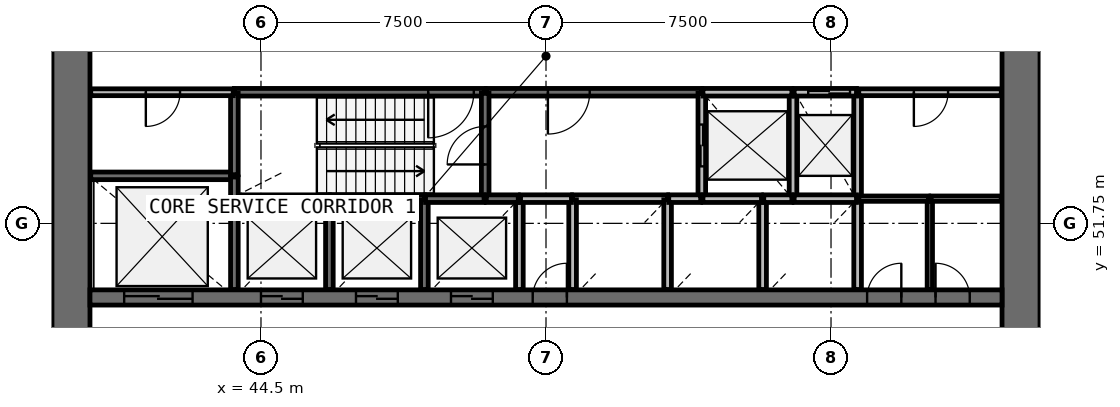
"""IFC4 building model, lengths in metres.
Left out: names, types, materials, properties, quantities, classifications, styles, units other than length and angle.
Written with IfcOpenShell. Run it as: python <this file> out.ifc"""

import sys

from ifc_helpers import new_model, si_unit, direction, frame, frame_2d, origin, place, context, subcontext, project, spatial, rectangle, extrude, source, transform, mapped, element, fill, save


model = new_model("IFC4")
c1 = context("Model", 3, precision=1e-05, world=origin(), true_north=direction((0.0, 1.0)))
c2 = subcontext(c1, "Body", "Model", "MODEL_VIEW")
j1 = project(units=[si_unit("LENGTHUNIT", "METRE"), si_unit("PLANEANGLEUNIT", "RADIAN")], contexts=[c1])
p1 = place(None, origin())
s1 = spatial("IfcSite", under=j1, at=p1, CompositionType="ELEMENT")
p2 = place(p1, origin())
s2 = spatial("IfcBuilding", under=s1, at=p2, CompositionType="ELEMENT")
p3 = place(p2, frame((0.0, 0.0, 40.2)))
s3 = spatial("IfcBuildingStorey", under=s2, at=p3, CompositionType="ELEMENT", Elevation=40.2)
p4 = place(p3, frame((64.5, 38.0, 0.0), z_axis=(0.0, 0.0, 1.0), x_axis=(0.0, 1.0, 0.0)))
e1 = element("IfcWall", 1, at=p4, inside=s3, PredefinedType="SHEAR", context=c2, shape_type="SweptSolid", body=[
    extrude(rectangle(XDim=20.0, YDim=1.0, at=frame_2d((10.0, 0.0))), origin(), (0.0, 0.0, 1.0), 4.4),
])
p5 = place(p4, frame((9.1, 0.0, 0.0)))
e2 = element("IfcOpeningElement", 2, at=p5, cuts=e1, PredefinedType="OPENING", context=c2, shape_type="SweptSolid", body=[
    extrude(rectangle(XDim=1.8, YDim=2.1, at=frame_2d((0.9, 1.05))), frame((0.0, 0.51, 0.0), z_axis=(0.0, -1.0, 0.0), x_axis=(1.0, 0.0, 0.0)), (0.0, 0.0, 1.0), 1.02),
])
p6 = place(p3, frame((39.5, 58.0, 0.0), z_axis=(0.0, 0.0, 1.0), x_axis=(0.0, -1.0, 0.0)))
e3 = element("IfcWall", 3, at=p6, inside=s3, PredefinedType="SHEAR", context=c2, shape_type="SweptSolid", body=[
    extrude(rectangle(XDim=20.0, YDim=1.0, at=frame_2d((10.0, 0.0))), origin(), (0.0, 0.0, 1.0), 4.4),
])
p7 = place(p6, frame((9.1, 0.0, 0.0)))
e4 = element("IfcOpeningElement", 4, at=p7, cuts=e3, PredefinedType="OPENING", context=c2, shape_type="SweptSolid", body=[
    extrude(rectangle(XDim=1.8, YDim=2.1, at=frame_2d((0.9, 1.05))), frame((0.0, 0.51, 0.0), z_axis=(0.0, -1.0, 0.0), x_axis=(1.0, 0.0, 0.0)), (0.0, 0.0, 1.0), 1.02),
])
p8 = place(p3, frame((40.0, 49.8, 0.0), z_axis=(0.0, 0.0, 1.0), x_axis=(1.0, 0.0, 0.0)))
e5 = element("IfcWall", 5, at=p8, inside=s3, PredefinedType="SHEAR", context=c2, shape_type="SweptSolid", body=[
    extrude(rectangle(XDim=24.0, YDim=0.4, at=frame_2d((12.0, 0.0))), origin(), (0.0, 0.0, 1.0), 4.4),
])
p9 = place(p8, frame((4.5, 0.0, 0.0)))
e6 = element("IfcOpeningElement", 6, at=p9, cuts=e5, PredefinedType="OPENING", context=c2, shape_type="SweptSolid", body=[
    extrude(rectangle(XDim=1.1, YDim=2.1, at=frame_2d((0.55, 1.05))), frame((0.0, 0.21, 0.0), z_axis=(0.0, -1.0, 0.0), x_axis=(1.0, 0.0, 0.0)), (0.0, 0.0, 1.0), 0.42),
])
p10 = place(p8, frame((7.0, 0.0, 0.0)))
e7 = element("IfcOpeningElement", 7, at=p10, cuts=e5, PredefinedType="OPENING", context=c2, shape_type="SweptSolid", body=[
    extrude(rectangle(XDim=1.1, YDim=2.1, at=frame_2d((0.55, 1.05))), frame((0.0, 0.21, 0.0), z_axis=(0.0, -1.0, 0.0), x_axis=(1.0, 0.0, 0.0)), (0.0, 0.0, 1.0), 0.42),
])
p11 = place(p8, frame((9.5, 0.0, 0.0)))
e8 = element("IfcOpeningElement", 8, at=p11, cuts=e5, PredefinedType="OPENING", context=c2, shape_type="SweptSolid", body=[
    extrude(rectangle(XDim=1.1, YDim=2.1, at=frame_2d((0.55, 1.05))), frame((0.0, 0.21, 0.0), z_axis=(0.0, -1.0, 0.0), x_axis=(1.0, 0.0, 0.0)), (0.0, 0.0, 1.0), 0.42),
])
p12 = place(p8, frame((0.9, 0.0, 0.0)))
e9 = element("IfcOpeningElement", 9, at=p12, cuts=e5, PredefinedType="OPENING", context=c2, shape_type="SweptSolid", body=[
    extrude(rectangle(XDim=1.8, YDim=2.4, at=frame_2d((0.9, 1.2))), frame((0.0, 0.21, 0.0), z_axis=(0.0, -1.0, 0.0), x_axis=(1.0, 0.0, 0.0)), (0.0, 0.0, 1.0), 0.42),
])
p13 = place(p8, frame((20.45, 0.0, 0.0)))
e10 = element("IfcOpeningElement", 10, at=p13, cuts=e5, PredefinedType="OPENING", context=c2, shape_type="SweptSolid", body=[
    extrude(rectangle(XDim=0.9, YDim=2.1, at=frame_2d((0.45, 1.05))), frame((0.0, 0.21, 0.0), z_axis=(0.0, -1.0, 0.0), x_axis=(1.0, 0.0, 0.0)), (0.0, 0.0, 1.0), 0.42),
])
p14 = place(p8, frame((22.25, 0.0, 0.0)))
e11 = element("IfcOpeningElement", 11, at=p14, cuts=e5, PredefinedType="OPENING", context=c2, shape_type="SweptSolid", body=[
    extrude(rectangle(XDim=0.9, YDim=2.1, at=frame_2d((0.45, 1.05))), frame((0.0, 0.21, 0.0), z_axis=(0.0, -1.0, 0.0), x_axis=(1.0, 0.0, 0.0)), (0.0, 0.0, 1.0), 0.42),
])
p15 = place(p8, frame((11.65, 0.0, 0.0)))
e12 = element("IfcOpeningElement", 12, at=p15, cuts=e5, PredefinedType="OPENING", context=c2, shape_type="SweptSolid", body=[
    extrude(rectangle(XDim=0.9, YDim=2.1, at=frame_2d((0.45, 1.05))), frame((0.0, 0.21, 0.0), z_axis=(0.0, -1.0, 0.0), x_axis=(1.0, 0.0, 0.0)), (0.0, 0.0, 1.0), 0.42),
])
p16 = place(p3, frame((50.4, 55.2, 0.0), z_axis=(0.0, 0.0, 1.0), x_axis=(-1.0, 0.0, 0.0)))
e13 = element("IfcWall", 13, at=p16, inside=s3, PredefinedType="SOLIDWALL", context=c2, shape_type="SweptSolid", body=[
    extrude(rectangle(XDim=6.6, YDim=0.2, at=frame_2d((3.3, 0.0))), origin(), (0.0, 0.0, 1.0), 3.95),
])
p17 = place(p16, frame((0.3, 0.0, 0.0)))
e14 = element("IfcOpeningElement", 14, at=p17, cuts=e13, PredefinedType="OPENING", context=c2, shape_type="SweptSolid", body=[
    extrude(rectangle(XDim=1.2, YDim=2.1, at=frame_2d((0.6, 1.05))), frame((0.0, 0.11, 0.0), z_axis=(0.0, -1.0, 0.0), x_axis=(1.0, 0.0, 0.0)), (0.0, 0.0, 1.0), 0.22),
])
p18 = place(p3, frame((56.1, 55.2, 0.0), z_axis=(0.0, 0.0, 1.0), x_axis=(-1.0, 0.0, 0.0)))
e15 = element("IfcWall", 15, at=p18, inside=s3, PredefinedType="SOLIDWALL", context=c2, shape_type="SweptSolid", body=[
    extrude(rectangle(XDim=5.67, YDim=0.2, at=frame_2d((2.835, 0.0))), origin(), (0.0, 0.0, 1.0), 3.95),
])
p19 = place(p18, frame((2.95, 0.0, 0.0)))
e16 = element("IfcOpeningElement", 16, at=p19, cuts=e15, PredefinedType="OPENING", context=c2, shape_type="SweptSolid", body=[
    extrude(rectangle(XDim=1.1, YDim=2.1, at=frame_2d((0.55, 1.05))), frame((0.0, 0.11, 0.0), z_axis=(0.0, -1.0, 0.0), x_axis=(1.0, 0.0, 0.0)), (0.0, 0.0, 1.0), 0.22),
])
p20 = place(p3, frame((43.8, 53.0, 0.0), z_axis=(0.0, 0.0, 1.0), x_axis=(-1.0, 0.0, 0.0)))
e17 = element("IfcWall", 17, at=p20, inside=s3, PredefinedType="SOLIDWALL", context=c2, shape_type="SweptSolid", body=[
    extrude(rectangle(XDim=3.78, YDim=0.2, at=frame_2d((1.89, 0.0))), origin(), (0.0, 0.0, 1.0), 3.95),
])
p21 = place(p3, frame((50.4, 52.4, 0.0), z_axis=(0.0, 0.0, 1.0), x_axis=(0.0, 1.0, 0.0)))
e18 = element("IfcWall", 18, at=p21, inside=s3, PredefinedType="SOLIDWALL", context=c2, shape_type="SweptSolid", body=[
    extrude(rectangle(XDim=2.77, YDim=0.2, at=frame_2d((1.385, 0.0))), origin(), (0.0, 0.0, 1.0), 3.95),
])
p22 = place(p21, frame((0.9, 0.0, 0.0)))
e19 = element("IfcOpeningElement", 19, at=p22, cuts=e18, PredefinedType="OPENING", context=c2, shape_type="SweptSolid", body=[
    extrude(rectangle(XDim=1.0, YDim=2.1, at=frame_2d((0.5, 1.05))), frame((0.0, 0.11, 0.0), z_axis=(0.0, -1.0, 0.0), x_axis=(1.0, 0.0, 0.0)), (0.0, 0.0, 1.0), 0.22),
])
p23 = place(p3, frame((56.1, 55.17, 0.0), z_axis=(0.0, 0.0, 1.0), x_axis=(0.0, -1.0, 0.0)))
e20 = element("IfcWall", 20, at=p23, inside=s3, PredefinedType="SOLIDWALL", context=c2, shape_type="SweptSolid", body=[
    extrude(rectangle(XDim=2.77, YDim=0.2, at=frame_2d((1.385, 0.0))), origin(), (0.0, 0.0, 1.0), 3.95),
])
p24 = place(p23, frame((0.82, 0.0, 0.0)))
e21 = element("IfcOpeningElement", 21, at=p24, cuts=e20, PredefinedType="OPENING", context=c2, shape_type="SweptSolid", body=[
    extrude(rectangle(XDim=1.1, YDim=2.1, at=frame_2d((0.55, 1.05))), frame((0.0, 0.11, 0.0), z_axis=(0.0, -1.0, 0.0), x_axis=(1.0, 0.0, 0.0)), (0.0, 0.0, 1.0), 0.22),
])
for number, where, z_axis, x_axis in (
    (22, (58.5, 52.4, 0.0), (0.0, 0.0, 1.0), (0.0, 1.0, 0.0)),
    (23, (60.2, 52.4, 0.0), (0.0, 0.0, 1.0), (0.0, 1.0, 0.0)),
):
    element("IfcWall", number, at=place(p3, frame(where, z_axis=z_axis, x_axis=x_axis)), inside=s3, PredefinedType="SOLIDWALL", context=c2, shape_type="SweptSolid", body=[
        extrude(rectangle(XDim=2.8, YDim=0.2, at=frame_2d((1.4, 0.0))), origin(), (0.0, 0.0, 1.0), 3.95),
    ])
p25 = place(p3, frame((46.3, 52.4, 0.0), z_axis=(0.0, 0.0, 1.0), x_axis=(-1.0, 0.0, 0.0)))
e24 = element("IfcWall", 24, at=p25, inside=s3, PredefinedType="SOLIDWALL", context=c2, shape_type="SweptSolid", body=[
    extrude(rectangle(XDim=2.5, YDim=0.2, at=frame_2d((1.25, 0.0))), origin(), (0.0, 0.0, 1.0), 3.95),
])
p26 = place(p3, frame((48.8, 52.4, 0.0), z_axis=(0.0, 0.0, 1.0), x_axis=(-1.0, 0.0, 0.0)))
e25 = element("IfcWall", 25, at=p26, inside=s3, PredefinedType="SOLIDWALL", context=c2, shape_type="SweptSolid", body=[
    extrude(rectangle(XDim=2.47, YDim=0.2, at=frame_2d((1.235, 0.0))), origin(), (0.0, 0.0, 1.0), 3.95),
])
p27 = place(p3, frame((55.2, 52.4, 0.0), z_axis=(0.0, 0.0, 1.0), x_axis=(-1.0, 0.0, 0.0)))
e26 = element("IfcWall", 26, at=p27, inside=s3, PredefinedType="SOLIDWALL", context=c2, shape_type="SweptSolid", body=[
    extrude(rectangle(XDim=2.5, YDim=0.2, at=frame_2d((1.25, 0.0))), origin(), (0.0, 0.0, 1.0), 3.95),
])
p28 = place(p3, frame((58.47, 55.2, 0.0), z_axis=(0.0, 0.0, 1.0), x_axis=(-1.0, 0.0, 0.0)))
e27 = element("IfcWall", 27, at=p28, inside=s3, PredefinedType="SOLIDWALL", context=c2, shape_type="SweptSolid", body=[
    extrude(rectangle(XDim=2.34, YDim=0.2, at=frame_2d((1.17, 0.0))), origin(), (0.0, 0.0, 1.0), 3.95),
])
for number, where, z_axis, x_axis in (
    (28, (43.8, 52.37, 0.0), (0.0, 0.0, 1.0), (0.0, -1.0, 0.0)),
    (29, (46.3, 50.01, 0.0), (0.0, 0.0, 1.0), (0.0, 1.0, 0.0)),
    (30, (48.8, 50.01, 0.0), (0.0, 0.0, 1.0), (0.0, 1.0, 0.0)),
):
    element("IfcWall", number, at=place(p3, frame(where, z_axis=z_axis, x_axis=x_axis)), inside=s3, PredefinedType="SOLIDWALL", context=c2, shape_type="SweptSolid", body=[
        extrude(rectangle(XDim=2.36, YDim=0.2, at=frame_2d((1.18, 0.0))), origin(), (0.0, 0.0, 1.0), 3.95),
    ])
p29 = place(p3, frame((51.3, 50.01, 0.0), z_axis=(0.0, 0.0, 1.0), x_axis=(0.0, 1.0, 0.0)))
e31 = element("IfcWall", 31, at=p29, inside=s3, PredefinedType="SOLIDWALL", context=c2, shape_type="SweptSolid", body=[
    extrude(rectangle(XDim=2.39, YDim=0.2, at=frame_2d((1.195, 0.0))), origin(), (0.0, 0.0, 1.0), 3.95),
])
for number, where, z_axis, x_axis in (
    (32, (52.7, 52.37, 0.0), (0.0, 0.0, 1.0), (0.0, -1.0, 0.0)),
    (33, (55.2, 50.01, 0.0), (0.0, 0.0, 1.0), (0.0, 1.0, 0.0)),
):
    element("IfcWall", number, at=place(p3, frame(where, z_axis=z_axis, x_axis=x_axis)), inside=s3, PredefinedType="SOLIDWALL", context=c2, shape_type="SweptSolid", body=[
        extrude(rectangle(XDim=2.36, YDim=0.2, at=frame_2d((1.18, 0.0))), origin(), (0.0, 0.0, 1.0), 3.95),
    ])
p30 = place(p3, frame((57.7, 50.01, 0.0), z_axis=(0.0, 0.0, 1.0), x_axis=(0.0, 1.0, 0.0)))
e34 = element("IfcWall", 34, at=p30, inside=s3, PredefinedType="SOLIDWALL", context=c2, shape_type="SweptSolid", body=[
    extrude(rectangle(XDim=2.39, YDim=0.2, at=frame_2d((1.195, 0.0))), origin(), (0.0, 0.0, 1.0), 3.95),
])
p31 = place(p3, frame((60.2, 50.01, 0.0), z_axis=(0.0, 0.0, 1.0), x_axis=(0.0, 1.0, 0.0)))
e35 = element("IfcWall", 35, at=p31, inside=s3, PredefinedType="SOLIDWALL", context=c2, shape_type="SweptSolid", body=[
    extrude(rectangle(XDim=2.36, YDim=0.2, at=frame_2d((1.18, 0.0))), origin(), (0.0, 0.0, 1.0), 3.95),
])
p32 = place(p3, frame((43.8, 55.17, 0.0), z_axis=(0.0, 0.0, 1.0), x_axis=(0.0, -1.0, 0.0)))
e36 = element("IfcWall", 36, at=p32, inside=s3, PredefinedType="SOLIDWALL", context=c2, shape_type="SweptSolid", body=[
    extrude(rectangle(XDim=2.14, YDim=0.2, at=frame_2d((1.07, 0.0))), origin(), (0.0, 0.0, 1.0), 3.95),
])
p33 = place(p3, frame((60.17, 52.4, 0.0), z_axis=(0.0, 0.0, 1.0), x_axis=(-1.0, 0.0, 0.0)))
e37 = element("IfcWall", 37, at=p33, inside=s3, PredefinedType="SOLIDWALL", context=c2, shape_type="SweptSolid", body=[
    extrude(rectangle(XDim=1.64, YDim=0.2, at=frame_2d((0.82, 0.0))), origin(), (0.0, 0.0, 1.0), 3.95),
])
p34 = place(p3, frame((60.17, 55.2, 0.0), z_axis=(0.0, 0.0, 1.0), x_axis=(-1.0, 0.0, 0.0)))
e38 = element("IfcWall", 38, at=p34, inside=s3, PredefinedType="SOLIDWALL", context=c2, shape_type="SweptSolid", body=[
    extrude(rectangle(XDim=1.64, YDim=0.2, at=frame_2d((0.82, 0.0))), origin(), (0.0, 0.0, 1.0), 3.95),
])
p35 = place(p34, frame((0.17, 0.0, 0.0)))
e39 = element("IfcOpeningElement", 39, at=p35, cuts=e38, PredefinedType="OPENING", context=c2, shape_type="SweptSolid", body=[
    extrude(rectangle(XDim=1.1, YDim=2.1, at=frame_2d((0.55, 1.05))), frame((0.0, 0.11, 0.0), z_axis=(0.0, -1.0, 0.0), x_axis=(1.0, 0.0, 0.0)), (0.0, 0.0, 1.0), 0.22),
])
for number, where, z_axis, x_axis in (
    (40, (50.37, 52.4, 0.0), (0.0, 0.0, 1.0), (-1.0, 0.0, 0.0)),
    (41, (57.67, 52.4, 0.0), (0.0, 0.0, 1.0), (-1.0, 0.0, 0.0)),
):
    element("IfcWall", number, at=place(p3, frame(where, z_axis=z_axis, x_axis=x_axis)), inside=s3, PredefinedType="SOLIDWALL", context=c2, shape_type="SweptSolid", body=[
        extrude(rectangle(XDim=1.54, YDim=0.2, at=frame_2d((0.77, 0.0))), origin(), (0.0, 0.0, 1.0), 3.95),
    ])
p36 = place(p3, frame((51.33, 52.4, 0.0), z_axis=(0.0, 0.0, 1.0), x_axis=(1.0, 0.0, 0.0)))
e42 = element("IfcWall", 42, at=p36, inside=s3, PredefinedType="SOLIDWALL", context=c2, shape_type="SweptSolid", body=[
    extrude(rectangle(XDim=1.34, YDim=0.2, at=frame_2d((0.67, 0.0))), origin(), (0.0, 0.0, 1.0), 3.95),
])
for number, where, z_axis, x_axis in (
    (43, (51.27, 52.4, 0.0), (0.0, 0.0, 1.0), (-1.0, 0.0, 0.0)),
    (44, (56.07, 52.4, 0.0), (0.0, 0.0, 1.0), (-1.0, 0.0, 0.0)),
):
    element("IfcWall", number, at=place(p3, frame(where, z_axis=z_axis, x_axis=x_axis)), inside=s3, PredefinedType="SOLIDWALL", context=c2, shape_type="SweptSolid", body=[
        extrude(rectangle(XDim=0.84, YDim=0.2, at=frame_2d((0.42, 0.0))), origin(), (0.0, 0.0, 1.0), 3.95),
    ])
p37 = place(p3, frame((58.47, 52.4, 0.0), z_axis=(0.0, 0.0, 1.0), x_axis=(-1.0, 0.0, 0.0)))
e45 = element("IfcWall", 45, at=p37, inside=s3, PredefinedType="SOLIDWALL", context=c2, shape_type="SweptSolid", body=[
    extrude(rectangle(XDim=0.74, YDim=0.2, at=frame_2d((0.37, 0.0))), origin(), (0.0, 0.0, 1.0), 3.95),
])
p38 = place(p3, frame((43.8, 52.43, 0.0), z_axis=(0.0, 0.0, 1.0), x_axis=(0.0, 1.0, 0.0)))
e46 = element("IfcWall", 46, at=p38, inside=s3, PredefinedType="SOLIDWALL", context=c2, shape_type="SweptSolid", body=[
    extrude(rectangle(XDim=0.54, YDim=0.2, at=frame_2d((0.27, 0.0))), origin(), (0.0, 0.0, 1.0), 3.95),
])
p39 = place(p3, frame((43.77, 55.2, 0.0), z_axis=(0.0, 0.0, 1.0), x_axis=(-1.0, 0.0, 0.0)))
e47 = element("IfcWall", 47, at=p39, inside=s3, PredefinedType="PARTITIONING", context=c2, shape_type="SweptSolid", body=[
    extrude(rectangle(XDim=3.75, YDim=0.18, at=frame_2d((1.875, 0.0))), origin(), (0.0, 0.0, 1.0), 3.95),
])
p40 = place(p39, frame((1.4, 0.0, 0.0)))
e48 = element("IfcOpeningElement", 48, at=p40, cuts=e47, PredefinedType="OPENING", context=c2, shape_type="SweptSolid", body=[
    extrude(rectangle(XDim=0.9, YDim=2.1, at=frame_2d((0.45, 1.05))), frame((0.0, 0.1, 0.0), z_axis=(0.0, -1.0, 0.0), x_axis=(1.0, 0.0, 0.0)), (0.0, 0.0, 1.0), 0.2),
])
p41 = place(p3, frame((63.98, 55.2, 0.0), z_axis=(0.0, 0.0, 1.0), x_axis=(-1.0, 0.0, 0.0)))
e49 = element("IfcWall", 49, at=p41, inside=s3, PredefinedType="PARTITIONING", context=c2, shape_type="SweptSolid", body=[
    extrude(rectangle(XDim=3.75, YDim=0.18, at=frame_2d((1.875, 0.0))), origin(), (0.0, 0.0, 1.0), 3.95),
])
p42 = place(p41, frame((1.4, 0.0, 0.0)))
e50 = element("IfcOpeningElement", 50, at=p42, cuts=e49, PredefinedType="OPENING", context=c2, shape_type="SweptSolid", body=[
    extrude(rectangle(XDim=0.9, YDim=2.1, at=frame_2d((0.45, 1.05))), frame((0.0, 0.1, 0.0), z_axis=(0.0, -1.0, 0.0), x_axis=(1.0, 0.0, 0.0)), (0.0, 0.0, 1.0), 0.2),
])
p43 = place(p3, frame((62.1, 50.01, 0.0), z_axis=(0.0, 0.0, 1.0), x_axis=(0.0, 1.0, 0.0)))
e51 = element("IfcWall", 51, at=p43, inside=s3, PredefinedType="PARTITIONING", context=c2, shape_type="SweptSolid", body=[
    extrude(rectangle(XDim=2.39, YDim=0.14, at=frame_2d((1.195, 0.0))), origin(), (0.0, 0.0, 1.0), 3.05),
])
p44 = place(p3, frame((62.07, 52.4, 0.0), z_axis=(0.0, 0.0, 1.0), x_axis=(-1.0, 0.0, 0.0)))
e52 = element("IfcWall", 52, at=p44, inside=s3, PredefinedType="PARTITIONING", context=c2, shape_type="SweptSolid", body=[
    extrude(rectangle(XDim=1.84, YDim=0.14, at=frame_2d((0.92, 0.0))), origin(), (0.0, 0.0, 1.0), 3.05),
])
p45 = place(p3, frame((63.98, 52.4, 0.0), z_axis=(0.0, 0.0, 1.0), x_axis=(-1.0, 0.0, 0.0)))
e53 = element("IfcWall", 53, at=p45, inside=s3, PredefinedType="PARTITIONING", context=c2, shape_type="SweptSolid", body=[
    extrude(rectangle(XDim=1.85, YDim=0.14, at=frame_2d((0.925, 0.0))), origin(), (0.0, 0.0, 1.0), 3.05),
])
m1 = source(origin(), c2, "Body", "SweptSolid", [
    extrude(rectangle(XDim=1.1, YDim=2.1, at=frame_2d((0.55, 1.05))), frame((0.0, 0.025, 0.0), z_axis=(0.0, -1.0, 0.0), x_axis=(1.0, 0.0, 0.0)), (0.0, 0.0, 1.0), 0.05),
])
p46 = place(p9, origin())
e54 = element("IfcDoor", 54, at=p46, inside=s3, OperationType="DOUBLE_DOOR_SLIDING", PredefinedType="USERDEFINED", context=c2, shape_type="MappedRepresentation", body=[
    mapped(m1, transform((0.0, 0.0, 0.0), scale=1.0)),
])
fill(e6, e54)
p47 = place(p10, origin())
e55 = element("IfcDoor", 55, at=p47, inside=s3, OperationType="DOUBLE_DOOR_SLIDING", PredefinedType="USERDEFINED", context=c2, shape_type="MappedRepresentation", body=[
    mapped(m1, transform((0.0, 0.0, 0.0), scale=1.0)),
])
fill(e7, e55)
p48 = place(p11, origin())
e56 = element("IfcDoor", 56, at=p48, inside=s3, OperationType="DOUBLE_DOOR_SLIDING", PredefinedType="USERDEFINED", context=c2, shape_type="MappedRepresentation", body=[
    mapped(m1, transform((0.0, 0.0, 0.0), scale=1.0)),
])
fill(e8, e56)
p49 = place(p24, origin())
e57 = element("IfcDoor", 57, at=p49, inside=s3, OperationType="DOUBLE_DOOR_SLIDING", PredefinedType="USERDEFINED", context=c2, shape_type="MappedRepresentation", body=[
    mapped(m1, transform((0.0, 0.0, 0.0), scale=1.0)),
])
fill(e21, e57)
p50 = place(p35, origin())
e58 = element("IfcDoor", 58, at=p50, inside=s3, OperationType="DOUBLE_DOOR_SLIDING", PredefinedType="USERDEFINED", context=c2, shape_type="MappedRepresentation", body=[
    mapped(m1, transform((0.0, 0.0, 0.0), scale=1.0)),
])
fill(e39, e58)
m2 = source(origin(), c2, "Body", "SweptSolid", [
    extrude(rectangle(XDim=1.8, YDim=2.4, at=frame_2d((0.9, 1.2))), frame((0.0, 0.025, 0.0), z_axis=(0.0, -1.0, 0.0), x_axis=(1.0, 0.0, 0.0)), (0.0, 0.0, 1.0), 0.05),
])
p51 = place(p12, origin())
e59 = element("IfcDoor", 59, at=p51, inside=s3, OperationType="DOUBLE_DOOR_SLIDING", PredefinedType="USERDEFINED", context=c2, shape_type="MappedRepresentation", body=[
    mapped(m2, transform((0.0, 0.0, 0.0), scale=1.0)),
])
fill(e9, e59)
m3 = source(origin(), c2, "Body", "SweptSolid", [
    extrude(rectangle(XDim=1.2, YDim=2.1, at=frame_2d((0.6, 1.05))), frame((0.0, 0.025, 0.0), z_axis=(0.0, -1.0, 0.0), x_axis=(1.0, 0.0, 0.0)), (0.0, 0.0, 1.0), 0.05),
])
p52 = place(p17, origin())
e60 = element("IfcDoor", 60, at=p52, inside=s3, OperationType="SINGLE_SWING_RIGHT", PredefinedType="DOOR", context=c2, shape_type="MappedRepresentation", body=[
    mapped(m3, transform((0.0, 0.0, 0.0), scale=1.0)),
])
fill(e14, e60)
m4 = source(origin(), c2, "Body", "SweptSolid", [
    extrude(rectangle(XDim=1.0, YDim=2.1, at=frame_2d((0.5, 1.05))), frame((0.0, 0.025, 0.0), z_axis=(0.0, -1.0, 0.0), x_axis=(1.0, 0.0, 0.0)), (0.0, 0.0, 1.0), 0.05),
])
p53 = place(p22, origin())
e61 = element("IfcDoor", 61, at=p53, inside=s3, OperationType="SINGLE_SWING_LEFT", PredefinedType="DOOR", context=c2, shape_type="MappedRepresentation", body=[
    mapped(m4, transform((0.0, 0.0, 0.0), scale=1.0)),
])
fill(e19, e61)
m5 = source(origin(), c2, "Body", "SweptSolid", [
    extrude(rectangle(XDim=1.1, YDim=2.1, at=frame_2d((0.55, 1.05))), frame((0.0, 0.025, 0.0), z_axis=(0.0, -1.0, 0.0), x_axis=(1.0, 0.0, 0.0)), (0.0, 0.0, 1.0), 0.05),
])
p54 = place(p19, origin())
e62 = element("IfcDoor", 62, at=p54, inside=s3, OperationType="SINGLE_SWING_RIGHT", PredefinedType="DOOR", context=c2, shape_type="MappedRepresentation", body=[
    mapped(m5, transform((0.0, 0.0, 0.0), scale=1.0)),
])
fill(e16, e62)
m6 = source(origin(), c2, "Body", "SweptSolid", [
    extrude(rectangle(XDim=0.9, YDim=2.1, at=frame_2d((0.45, 1.05))), frame((0.0, 0.025, 0.0), z_axis=(0.0, -1.0, 0.0), x_axis=(1.0, 0.0, 0.0)), (0.0, 0.0, 1.0), 0.05),
])
p55 = place(p40, origin())
e63 = element("IfcDoor", 63, at=p55, inside=s3, OperationType="SINGLE_SWING_RIGHT", PredefinedType="DOOR", context=c2, shape_type="MappedRepresentation", body=[
    mapped(m6, transform((0.0, 0.0, 0.0), scale=1.0)),
])
fill(e48, e63)
p56 = place(p13, origin())
e64 = element("IfcDoor", 64, at=p56, inside=s3, OperationType="SINGLE_SWING_RIGHT", PredefinedType="DOOR", context=c2, shape_type="MappedRepresentation", body=[
    mapped(m6, transform((0.0, 0.0, 0.0), scale=1.0)),
])
fill(e10, e64)
p57 = place(p14, origin())
e65 = element("IfcDoor", 65, at=p57, inside=s3, OperationType="SINGLE_SWING_LEFT", PredefinedType="DOOR", context=c2, shape_type="MappedRepresentation", body=[
    mapped(m6, transform((0.0, 0.0, 0.0), scale=1.0)),
])
fill(e11, e65)
p58 = place(p42, origin())
e66 = element("IfcDoor", 66, at=p58, inside=s3, OperationType="SINGLE_SWING_RIGHT", PredefinedType="DOOR", context=c2, shape_type="MappedRepresentation", body=[
    mapped(m6, transform((0.0, 0.0, 0.0), scale=1.0)),
])
fill(e50, e66)
p59 = place(p15, origin())
e67 = element("IfcDoor", 67, at=p59, inside=s3, OperationType="SINGLE_SWING_RIGHT", PredefinedType="DOOR", context=c2, shape_type="MappedRepresentation", body=[
    mapped(m6, transform((0.0, 0.0, 0.0), scale=1.0)),
])
fill(e12, e67)
save(model, sys.argv[1])
